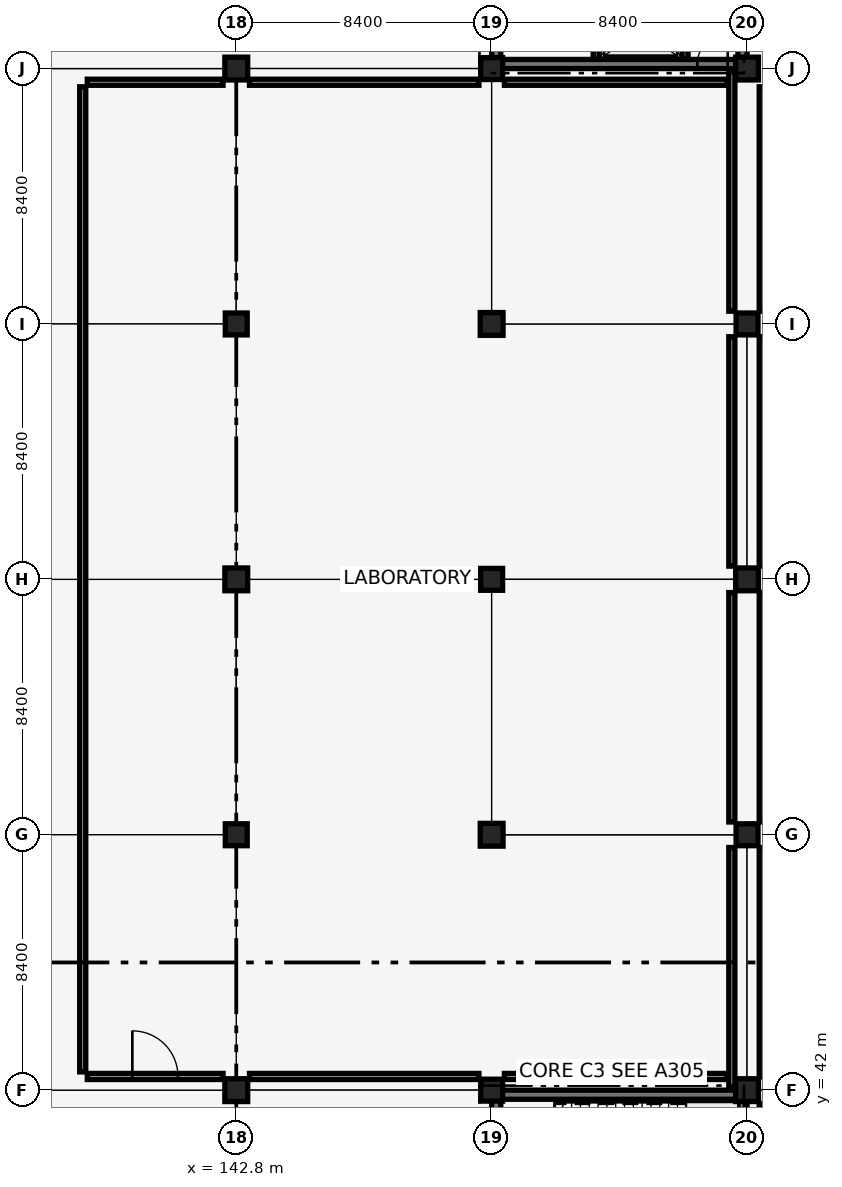
"""IFC4 building model, lengths in metres.
Left out: names, types, materials, properties, quantities, classifications, styles, units other than length and angle.
Written with IfcOpenShell. Run it as: python <this file> out.ifc"""

import sys

from ifc_helpers import new_model, si_unit, direction, frame, frame_2d, origin, origin_2d, place, context, subcontext, project, spatial, rectangle, extrude, element, fill, save


model = new_model("IFC4")
c1 = context("Model", 3, precision=1e-05, world=origin(), true_north=direction((0.0, 1.0)))
c2 = subcontext(c1, "Body", "Model", "MODEL_VIEW")
j1 = project(units=[si_unit("LENGTHUNIT", "METRE"), si_unit("PLANEANGLEUNIT", "RADIAN")], contexts=[c1])
p1 = place(None, origin())
s1 = spatial("IfcSite", under=j1, at=p1, CompositionType="ELEMENT")
p2 = place(p1, origin())
s2 = spatial("IfcBuilding", under=s1, at=p2, CompositionType="ELEMENT")
p3 = place(p2, origin())
s3 = spatial("IfcBuildingStorey", under=s2, at=p3, CompositionType="ELEMENT", Elevation=0.0)
p4 = place(p3, frame((151.35, 41.85, 0.0), z_axis=(0.0, 0.0, 1.0), x_axis=(1.0, 0.0, 0.0)))
e1 = element("IfcWall", 1, at=p4, inside=s3, PredefinedType="SHEAR", context=c2, shape_type="SweptSolid", body=[
    extrude(rectangle(XDim=8.1, YDim=0.3, at=frame_2d((4.05, 0.0))), origin(), (0.0, 0.0, 1.0), 5.14),
])
p5 = place(p3, frame((151.35, 33.75, 0.0), z_axis=(0.0, 0.0, 1.0), x_axis=(0.0, 1.0, 0.0)))
e2 = element("IfcWall", 2, at=p5, inside=s3, PredefinedType="SHEAR", context=c2, shape_type="SweptSolid", body=[
    extrude(rectangle(XDim=8.1, YDim=0.3, at=frame_2d((4.05, 0.0))), origin(), (0.0, 0.0, 1.0), 5.14),
])
p6 = place(p5, frame((1.325, 0.0, 0.0)))
e3 = element("IfcOpeningElement", 3, at=p6, cuts=e2, PredefinedType="OPENING", context=c2, shape_type="SweptSolid", body=[
    extrude(rectangle(XDim=1.45, YDim=2.15, at=frame_2d((0.725, 1.075))), frame((0.0, 0.16, 0.0), z_axis=(0.0, -1.0, 0.0), x_axis=(1.0, 0.0, 0.0)), (0.0, 0.0, 1.0), 0.32),
])
p7 = place(p3, frame((159.45, 33.75, 0.0), z_axis=(0.0, 0.0, 1.0), x_axis=(0.0, 1.0, 0.0)))
e4 = element("IfcWall", 4, at=p7, inside=s3, PredefinedType="SHEAR", context=c2, shape_type="SweptSolid", body=[
    extrude(rectangle(XDim=8.1, YDim=0.3, at=frame_2d((4.05, 0.0))), origin(), (0.0, 0.0, 1.0), 5.14),
])
p8 = place(p3, frame((151.35, 75.75, 0.0), z_axis=(0.0, 0.0, 1.0), x_axis=(1.0, 0.0, 0.0)))
e5 = element("IfcWall", 5, at=p8, inside=s3, PredefinedType="SHEAR", context=c2, shape_type="SweptSolid", body=[
    extrude(rectangle(XDim=8.1, YDim=0.3, at=frame_2d((4.05, 0.0))), origin(), (0.0, 0.0, 1.0), 5.14),
])
p9 = place(p8, frame((6.615, 0.0, 0.0)))
e6 = element("IfcOpeningElement", 6, at=p9, cuts=e5, PredefinedType="OPENING", context=c2, shape_type="SweptSolid", body=[
    extrude(rectangle(XDim=1.0, YDim=2.15, at=frame_2d((0.5, 1.075))), frame((0.0, 0.16, 0.0), z_axis=(0.0, -1.0, 0.0), x_axis=(1.0, 0.0, 0.0)), (0.0, 0.0, 1.0), 0.32),
])
p10 = place(p3, frame((151.35, 75.75, 0.0), z_axis=(0.0, 0.0, 1.0), x_axis=(0.0, 1.0, 0.0)))
e7 = element("IfcWall", 7, at=p10, inside=s3, PredefinedType="SHEAR", context=c2, shape_type="SweptSolid", body=[
    extrude(rectangle(XDim=8.1, YDim=0.3, at=frame_2d((4.05, 0.0))), origin(), (0.0, 0.0, 1.0), 5.14),
])
p11 = place(p10, frame((1.325, 0.0, 0.0)))
e8 = element("IfcOpeningElement", 8, at=p11, cuts=e7, PredefinedType="OPENING", context=c2, shape_type="SweptSolid", body=[
    extrude(rectangle(XDim=1.45, YDim=2.15, at=frame_2d((0.725, 1.075))), frame((0.0, 0.16, 0.0), z_axis=(0.0, -1.0, 0.0), x_axis=(1.0, 0.0, 0.0)), (0.0, 0.0, 1.0), 0.32),
])
p12 = place(p3, frame((159.45, 75.75, 0.0), z_axis=(0.0, 0.0, 1.0), x_axis=(0.0, 1.0, 0.0)))
e9 = element("IfcWall", 9, at=p12, inside=s3, PredefinedType="SHEAR", context=c2, shape_type="SweptSolid", body=[
    extrude(rectangle(XDim=8.1, YDim=0.3, at=frame_2d((4.05, 0.0))), origin(), (0.0, 0.0, 1.0), 5.14),
])
p13 = place(p3, frame((142.8, 42.0, 0.0), z_axis=(0.0, 0.0, 1.0), x_axis=(1.0, 0.0, 0.0)))
e10 = element("IfcColumn", 10, at=p13, inside=s3, PredefinedType="COLUMN", context=c2, shape_type="SweptSolid", body=[
    extrude(rectangle(XDim=0.75, YDim=0.75, at=origin_2d()), origin(), (0.0, 0.0, 1.0), 5.14),
])
p14 = place(p3, frame((142.8, 50.4, 0.0), z_axis=(0.0, 0.0, 1.0), x_axis=(1.0, 0.0, 0.0)))
e11 = element("IfcColumn", 11, at=p14, inside=s3, PredefinedType="COLUMN", context=c2, shape_type="SweptSolid", body=[
    extrude(rectangle(XDim=0.72, YDim=0.72, at=origin_2d()), origin(), (0.0, 0.0, 1.0), 5.14),
])
p15 = place(p3, frame((142.8, 58.8, 0.0), z_axis=(0.0, 0.0, 1.0), x_axis=(1.0, 0.0, 0.0)))
e12 = element("IfcColumn", 12, at=p15, inside=s3, PredefinedType="COLUMN", context=c2, shape_type="SweptSolid", body=[
    extrude(rectangle(XDim=0.75, YDim=0.75, at=origin_2d()), origin(), (0.0, 0.0, 1.0), 5.14),
])
p16 = place(p3, frame((142.8, 67.2, 0.0), z_axis=(0.0, 0.0, 1.0), x_axis=(1.0, 0.0, 0.0)))
e13 = element("IfcColumn", 13, at=p16, inside=s3, PredefinedType="COLUMN", context=c2, shape_type="SweptSolid", body=[
    extrude(rectangle(XDim=0.72, YDim=0.72, at=origin_2d()), origin(), (0.0, 0.0, 1.0), 5.14),
])
p17 = place(p3, frame((142.8, 75.6, 0.0), z_axis=(0.0, 0.0, 1.0), x_axis=(1.0, 0.0, 0.0)))
e14 = element("IfcColumn", 14, at=p17, inside=s3, PredefinedType="COLUMN", context=c2, shape_type="SweptSolid", body=[
    extrude(rectangle(XDim=0.75, YDim=0.75, at=origin_2d()), origin(), (0.0, 0.0, 1.0), 5.14),
])
p18 = place(p3, frame((151.2, 42.0, 0.0), z_axis=(0.0, 0.0, 1.0), x_axis=(1.0, 0.0, 0.0)))
e15 = element("IfcColumn", 15, at=p18, inside=s3, PredefinedType="COLUMN", context=c2, shape_type="SweptSolid", body=[
    extrude(rectangle(XDim=0.72, YDim=0.72, at=origin_2d()), origin(), (0.0, 0.0, 1.0), 5.14),
])
p19 = place(p3, frame((151.2, 50.4, 0.0), z_axis=(0.0, 0.0, 1.0), x_axis=(1.0, 0.0, 0.0)))
e16 = element("IfcColumn", 16, at=p19, inside=s3, PredefinedType="COLUMN", context=c2, shape_type="SweptSolid", body=[
    extrude(rectangle(XDim=0.75, YDim=0.75, at=origin_2d()), origin(), (0.0, 0.0, 1.0), 5.14),
])
p20 = place(p3, frame((151.2, 58.8, 0.0), z_axis=(0.0, 0.0, 1.0), x_axis=(1.0, 0.0, 0.0)))
e17 = element("IfcColumn", 17, at=p20, inside=s3, PredefinedType="COLUMN", context=c2, shape_type="SweptSolid", body=[
    extrude(rectangle(XDim=0.72, YDim=0.72, at=origin_2d()), origin(), (0.0, 0.0, 1.0), 5.14),
])
p21 = place(p3, frame((151.2, 67.2, 0.0), z_axis=(0.0, 0.0, 1.0), x_axis=(1.0, 0.0, 0.0)))
e18 = element("IfcColumn", 18, at=p21, inside=s3, PredefinedType="COLUMN", context=c2, shape_type="SweptSolid", body=[
    extrude(rectangle(XDim=0.75, YDim=0.75, at=origin_2d()), origin(), (0.0, 0.0, 1.0), 5.14),
])
p22 = place(p3, frame((151.2, 75.6, 0.0), z_axis=(0.0, 0.0, 1.0), x_axis=(1.0, 0.0, 0.0)))
e19 = element("IfcColumn", 19, at=p22, inside=s3, PredefinedType="COLUMN", context=c2, shape_type="SweptSolid", body=[
    extrude(rectangle(XDim=0.72, YDim=0.72, at=origin_2d()), origin(), (0.0, 0.0, 1.0), 5.14),
])
p23 = place(p3, frame((159.6, 42.0, 0.0), z_axis=(0.0, 0.0, 1.0), x_axis=(1.0, 0.0, 0.0)))
e20 = element("IfcColumn", 20, at=p23, inside=s3, PredefinedType="COLUMN", context=c2, shape_type="SweptSolid", body=[
    extrude(rectangle(XDim=0.75, YDim=0.75, at=origin_2d()), origin(), (0.0, 0.0, 1.0), 5.14),
])
p24 = place(p3, frame((159.6, 50.4, 0.0), z_axis=(0.0, 0.0, 1.0), x_axis=(1.0, 0.0, 0.0)))
e21 = element("IfcColumn", 21, at=p24, inside=s3, PredefinedType="COLUMN", context=c2, shape_type="SweptSolid", body=[
    extrude(rectangle(XDim=0.72, YDim=0.72, at=origin_2d()), origin(), (0.0, 0.0, 1.0), 5.14),
])
p25 = place(p3, frame((159.6, 58.8, 0.0), z_axis=(0.0, 0.0, 1.0), x_axis=(1.0, 0.0, 0.0)))
e22 = element("IfcColumn", 22, at=p25, inside=s3, PredefinedType="COLUMN", context=c2, shape_type="SweptSolid", body=[
    extrude(rectangle(XDim=0.75, YDim=0.75, at=origin_2d()), origin(), (0.0, 0.0, 1.0), 5.14),
])
p26 = place(p3, frame((159.6, 67.2, 0.0), z_axis=(0.0, 0.0, 1.0), x_axis=(1.0, 0.0, 0.0)))
e23 = element("IfcColumn", 23, at=p26, inside=s3, PredefinedType="COLUMN", context=c2, shape_type="SweptSolid", body=[
    extrude(rectangle(XDim=0.72, YDim=0.72, at=origin_2d()), origin(), (0.0, 0.0, 1.0), 5.14),
])
p27 = place(p3, frame((159.6, 75.6, 0.0), z_axis=(0.0, 0.0, 1.0), x_axis=(1.0, 0.0, 0.0)))
e24 = element("IfcColumn", 24, at=p27, inside=s3, PredefinedType="COLUMN", context=c2, shape_type="SweptSolid", body=[
    extrude(rectangle(XDim=0.75, YDim=0.75, at=origin_2d()), origin(), (0.0, 0.0, 1.0), 5.14),
])
p28 = place(p3, frame((154.64, 75.9, 0.0), z_axis=(0.0, 0.0, 1.0), x_axis=(0.0, 1.0, 0.0)))
e25 = element("IfcWall", 25, at=p28, inside=s3, PredefinedType="SHEAR", context=c2, shape_type="SweptSolid", body=[
    extrude(rectangle(XDim=3.8, YDim=0.2, at=frame_2d((1.9, 0.0))), origin(), (0.0, 0.0, 1.0), 4.46),
])
p29 = place(p28, frame((0.375, 0.0, 0.0)))
e26 = element("IfcOpeningElement", 26, at=p29, cuts=e25, PredefinedType="OPENING", context=c2, shape_type="SweptSolid", body=[
    extrude(rectangle(XDim=1.1, YDim=2.15, at=frame_2d((0.55, 1.075))), frame((0.0, 0.11, 0.0), z_axis=(0.0, -1.0, 0.0), x_axis=(1.0, 0.0, 0.0)), (0.0, 0.0, 1.0), 0.22),
])
p30 = place(p28, frame((2.325, 0.0, 0.0)))
e27 = element("IfcOpeningElement", 27, at=p30, cuts=e25, PredefinedType="OPENING", context=c2, shape_type="SweptSolid", body=[
    extrude(rectangle(XDim=1.1, YDim=2.15, at=frame_2d((0.55, 1.075))), frame((0.0, 0.11, 0.0), z_axis=(0.0, -1.0, 0.0), x_axis=(1.0, 0.0, 0.0)), (0.0, 0.0, 1.0), 0.22),
])
p31 = place(p3, frame((157.56, 75.9, 0.0), z_axis=(0.0, 0.0, 1.0), x_axis=(0.0, 1.0, 0.0)))
e28 = element("IfcWall", 28, at=p31, inside=s3, PredefinedType="SHEAR", context=c2, shape_type="SweptSolid", body=[
    extrude(rectangle(XDim=3.8, YDim=0.2, at=frame_2d((1.9, 0.0))), origin(), (0.0, 0.0, 1.0), 4.46),
])
p32 = place(p3, frame((137.9, 42.45, 0.0), z_axis=(0.0, 0.0, 1.0), x_axis=(1.0, 0.0, 0.0)))
e29 = element("IfcWall", 29, at=p32, inside=s3, PredefinedType="PARTITIONING", context=c2, shape_type="SweptSolid", body=[
    extrude(rectangle(XDim=4.465, YDim=0.2, at=frame_2d((2.232, 0.0))), origin(), (0.0, 0.0, 1.0), 5.14),
])
p33 = place(p32, frame((1.482, 0.0, 0.0)))
e30 = element("IfcOpeningElement", 30, at=p33, cuts=e29, PredefinedType="OPENING", context=c2, shape_type="SweptSolid", body=[
    extrude(rectangle(XDim=1.5, YDim=2.2, at=frame_2d((0.75, 1.1))), frame((0.0, 0.11, 0.0), z_axis=(0.0, -1.0, 0.0), x_axis=(1.0, 0.0, 0.0)), (0.0, 0.0, 1.0), 0.22),
])
p34 = place(p3, frame((143.235, 42.45, 0.0), z_axis=(0.0, 0.0, 1.0), x_axis=(1.0, 0.0, 0.0)))
e31 = element("IfcWall", 31, at=p34, inside=s3, PredefinedType="PARTITIONING", context=c2, shape_type="SweptSolid", body=[
    extrude(rectangle(XDim=7.545, YDim=0.2, at=frame_2d((3.772, 0.0))), origin(), (0.0, 0.0, 1.0), 5.14),
])
p35 = place(p3, frame((151.62, 42.45, 0.0), z_axis=(0.0, 0.0, 1.0), x_axis=(1.0, 0.0, 0.0)))
e32 = element("IfcWall", 32, at=p35, inside=s3, PredefinedType="PARTITIONING", context=c2, shape_type="SweptSolid", body=[
    extrude(rectangle(XDim=7.33, YDim=0.2, at=frame_2d((3.665, 0.0))), origin(), (0.0, 0.0, 1.0), 5.14),
])
p36 = place(p3, frame((137.9, 75.15, 0.0), z_axis=(0.0, 0.0, 1.0), x_axis=(1.0, 0.0, 0.0)))
e33 = element("IfcWall", 33, at=p36, inside=s3, PredefinedType="PARTITIONING", context=c2, shape_type="SweptSolid", body=[
    extrude(rectangle(XDim=4.465, YDim=0.2, at=frame_2d((2.232, 0.0))), origin(), (0.0, 0.0, 1.0), 5.14),
])
p37 = place(p3, frame((143.235, 75.15, 0.0), z_axis=(0.0, 0.0, 1.0), x_axis=(1.0, 0.0, 0.0)))
e34 = element("IfcWall", 34, at=p37, inside=s3, PredefinedType="PARTITIONING", context=c2, shape_type="SweptSolid", body=[
    extrude(rectangle(XDim=7.545, YDim=0.2, at=frame_2d((3.772, 0.0))), origin(), (0.0, 0.0, 1.0), 5.14),
])
p38 = place(p3, frame((151.62, 75.15, 0.0), z_axis=(0.0, 0.0, 1.0), x_axis=(1.0, 0.0, 0.0)))
e35 = element("IfcWall", 35, at=p38, inside=s3, PredefinedType="PARTITIONING", context=c2, shape_type="SweptSolid", body=[
    extrude(rectangle(XDim=7.33, YDim=0.2, at=frame_2d((3.665, 0.0))), origin(), (0.0, 0.0, 1.0), 5.14),
])
p39 = place(p3, frame((137.75, 42.6, 0.0), z_axis=(0.0, 0.0, 1.0), x_axis=(0.0, 1.0, 0.0)))
e36 = element("IfcWall", 36, at=p39, inside=s3, PredefinedType="PARTITIONING", context=c2, shape_type="SweptSolid", body=[
    extrude(rectangle(XDim=32.4, YDim=0.2, at=frame_2d((16.2, 0.0))), origin(), (0.0, 0.0, 1.0), 4.36),
])
p40 = place(p3, frame((159.1, 42.03, 0.0), z_axis=(0.0, 0.0, 1.0), x_axis=(0.0, 1.0, 0.0)))
e37 = element("IfcWall", 37, at=p40, inside=s3, PredefinedType="PARTITIONING", context=c2, shape_type="SweptSolid", body=[
    extrude(rectangle(XDim=7.95, YDim=0.2, at=frame_2d((3.975, 0.0))), origin(), (0.0, 0.0, 1.0), 4.46),
])
p41 = place(p3, frame((159.1, 50.82, 0.0), z_axis=(0.0, 0.0, 1.0), x_axis=(0.0, 1.0, 0.0)))
e38 = element("IfcWall", 38, at=p41, inside=s3, PredefinedType="PARTITIONING", context=c2, shape_type="SweptSolid", body=[
    extrude(rectangle(XDim=7.545, YDim=0.2, at=frame_2d((3.772, 0.0))), origin(), (0.0, 0.0, 1.0), 4.59),
])
p42 = place(p3, frame((159.1, 59.235, 0.0), z_axis=(0.0, 0.0, 1.0), x_axis=(0.0, 1.0, 0.0)))
e39 = element("IfcWall", 39, at=p42, inside=s3, PredefinedType="PARTITIONING", context=c2, shape_type="SweptSolid", body=[
    extrude(rectangle(XDim=7.545, YDim=0.2, at=frame_2d((3.772, 0.0))), origin(), (0.0, 0.0, 1.0), 4.58),
])
p43 = place(p3, frame((159.1, 67.62, 0.0), z_axis=(0.0, 0.0, 1.0), x_axis=(0.0, 1.0, 0.0)))
e40 = element("IfcWall", 40, at=p43, inside=s3, PredefinedType="PARTITIONING", context=c2, shape_type="SweptSolid", body=[
    extrude(rectangle(XDim=7.95, YDim=0.2, at=frame_2d((3.975, 0.0))), origin(), (0.0, 0.0, 1.0), 4.46),
])
p44 = place(p3, frame((160.1, 34.2, 0.0), z_axis=(0.0, 0.0, 1.0), x_axis=(0.0, 1.0, 0.0)))
e41 = element("IfcWall", 41, at=p44, inside=s3, PredefinedType="PARTITIONING", context=c2, shape_type="SweptSolid", body=[
    extrude(rectangle(XDim=7.365, YDim=0.2, at=frame_2d((3.683, 0.0))), origin(), (0.0, 0.0, 1.0), 4.58),
])
p45 = place(p3, frame((160.1, 42.435, 0.0), z_axis=(0.0, 0.0, 1.0), x_axis=(0.0, 1.0, 0.0)))
e42 = element("IfcWall", 42, at=p45, inside=s3, PredefinedType="PARTITIONING", context=c2, shape_type="SweptSolid", body=[
    extrude(rectangle(XDim=7.545, YDim=0.2, at=frame_2d((3.772, 0.0))), origin(), (0.0, 0.0, 1.0), 4.59),
])
p46 = place(p3, frame((160.1, 50.82, 0.0), z_axis=(0.0, 0.0, 1.0), x_axis=(0.0, 1.0, 0.0)))
e43 = element("IfcWall", 43, at=p46, inside=s3, PredefinedType="PARTITIONING", context=c2, shape_type="SweptSolid", body=[
    extrude(rectangle(XDim=7.545, YDim=0.2, at=frame_2d((3.772, 0.0))), origin(), (0.0, 0.0, 1.0), 4.58),
])
p47 = place(p3, frame((160.1, 59.235, 0.0), z_axis=(0.0, 0.0, 1.0), x_axis=(0.0, 1.0, 0.0)))
e44 = element("IfcWall", 44, at=p47, inside=s3, PredefinedType="PARTITIONING", context=c2, shape_type="SweptSolid", body=[
    extrude(rectangle(XDim=7.545, YDim=0.2, at=frame_2d((3.772, 0.0))), origin(), (0.0, 0.0, 1.0), 4.59),
])
p48 = place(p3, frame((160.1, 67.62, 0.0), z_axis=(0.0, 0.0, 1.0), x_axis=(0.0, 1.0, 0.0)))
e45 = element("IfcWall", 45, at=p48, inside=s3, PredefinedType="PARTITIONING", context=c2, shape_type="SweptSolid", body=[
    extrude(rectangle(XDim=7.38, YDim=0.2, at=frame_2d((3.69, 0.0))), origin(), (0.0, 0.0, 1.0), 4.58),
])
p49 = place(p9, origin())
e46 = element("IfcDoor", 46, at=p49, inside=s3, OperationType="SINGLE_SWING_RIGHT", PredefinedType="DOOR", context=c2, shape_type="SweptSolid", body=[
    extrude(rectangle(XDim=1.0, YDim=2.15, at=frame_2d((0.5, 1.075))), frame((0.0, 0.025, 0.0), z_axis=(0.0, -1.0, 0.0), x_axis=(1.0, 0.0, 0.0)), (0.0, 0.0, 1.0), 0.05),
])
fill(e6, e46)
p50 = place(p33, origin())
e47 = element("IfcDoor", 47, at=p50, inside=s3, OperationType="DOUBLE_DOOR_SINGLE_SWING", PredefinedType="DOOR", context=c2, shape_type="SweptSolid", body=[
    extrude(rectangle(XDim=1.5, YDim=2.2, at=frame_2d((0.75, 1.1))), frame((0.0, 0.025, 0.0), z_axis=(0.0, -1.0, 0.0), x_axis=(1.0, 0.0, 0.0)), (0.0, 0.0, 1.0), 0.05),
])
fill(e30, e47)
save(model, sys.argv[1])
